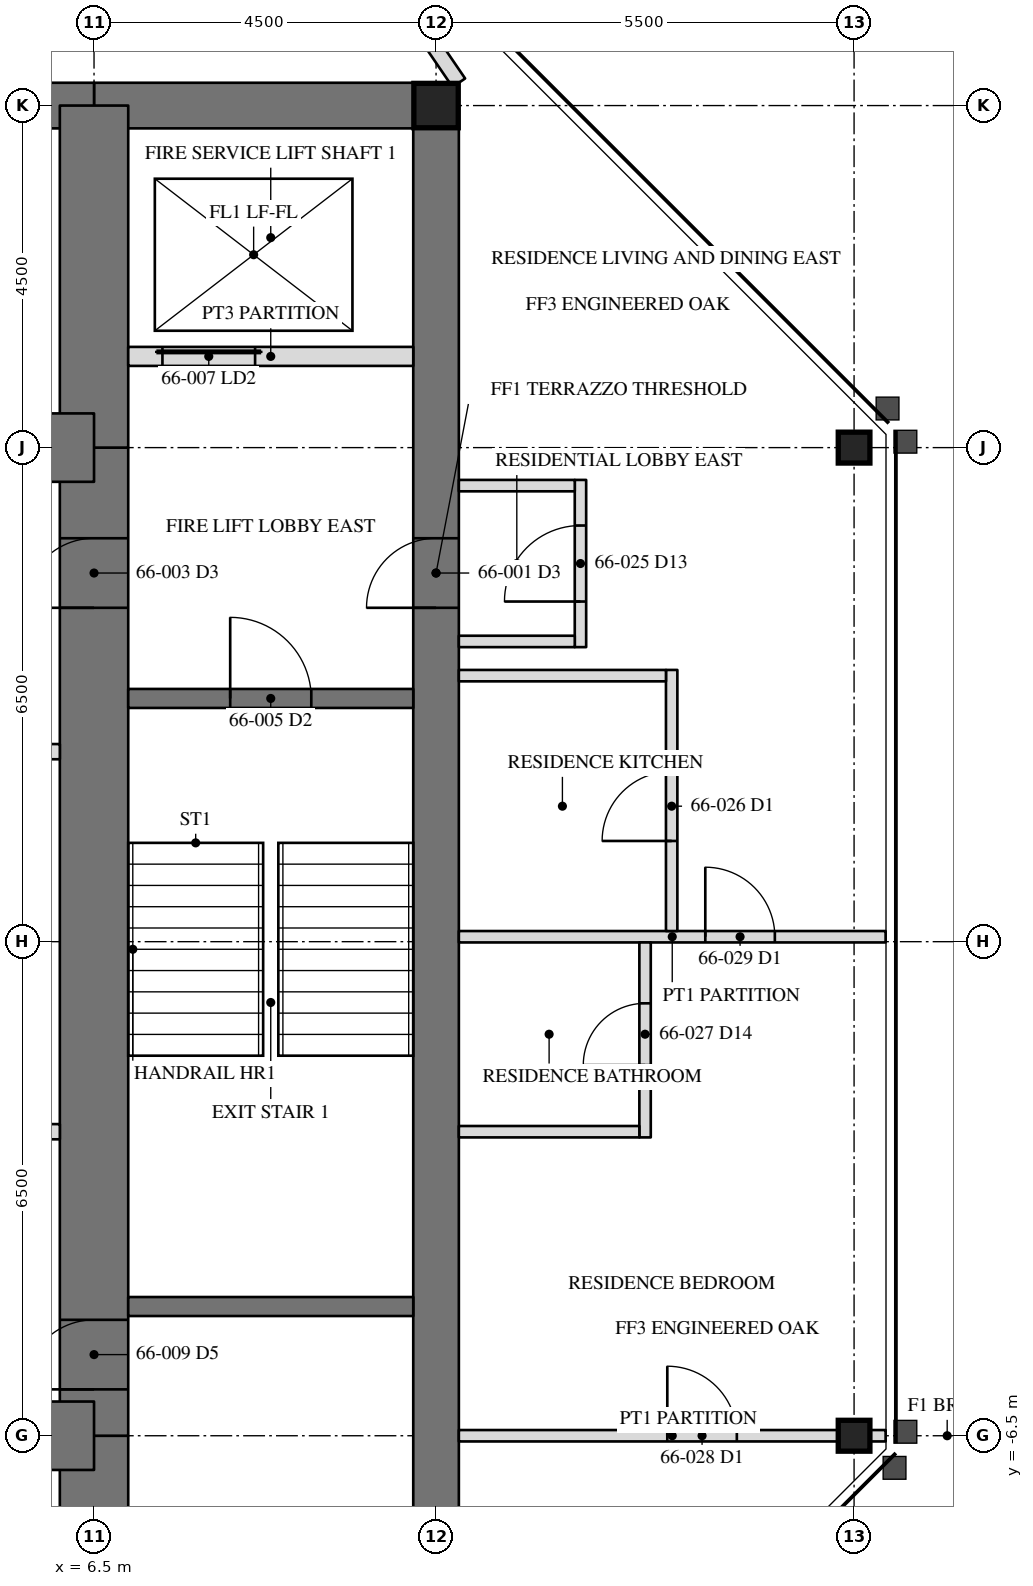
"""IFC4 building model, lengths in metres.
Left out: names, types, materials, properties, quantities, classifications, styles, units other than length and angle.
Written with IfcOpenShell. Run it as: python <this file> out.ifc"""

import sys

from ifc_helpers import new_model, si_unit, direction, frame, frame_2d, origin, origin_2d, place, context, subcontext, project, spatial, rectangle, hollow_rectangle, i_section, extrude, element, fill, save


model = new_model("IFC4")
c1 = context("Model", 3, precision=1e-05, world=origin(), true_north=direction((0.0, 1.0)))
c2 = subcontext(c1, "Body", "Model", "MODEL_VIEW")
j1 = project(units=[si_unit("LENGTHUNIT", "METRE"), si_unit("PLANEANGLEUNIT", "RADIAN")], contexts=[c1])
p1 = place(None, origin())
s1 = spatial("IfcSite", under=j1, at=p1, CompositionType="ELEMENT")
p2 = place(p1, origin())
s2 = spatial("IfcBuilding", under=s1, at=p2, CompositionType="ELEMENT")
p3 = place(p2, frame((0.0, 0.0, 270.4)))
s3 = spatial("IfcBuildingStorey", under=s2, at=p3, CompositionType="ELEMENT", Elevation=270.4)
for number, where, z_axis, x_axis in (
    (1, (16.5, -6.5, 0.0), (0.0, 0.0, 1.0), (0.0, 1.0, 0.0)),
    (2, (16.5, 6.5, 0.0), (0.0, 0.0, 1.0), (0.0, 1.0, 0.0)),
):
    element("IfcColumn", number, at=place(p3, frame(where, z_axis=z_axis, x_axis=x_axis)), inside=s3, PredefinedType="COLUMN", context=c2, shape_type="SweptSolid", body=[
        extrude(i_section(OverallWidth=0.406, OverallDepth=0.417, WebThickness=0.03, FlangeThickness=0.048, at=origin_2d()), origin(), (0.0, 0.0, 1.0), 3.6),
    ])
p4 = place(p3, frame((11.0, -11.0, 0.0), z_axis=(0.0, 0.0, 1.0), x_axis=(0.0, 1.0, 0.0)))
e3 = element("IfcWall", 3, at=p4, inside=s3, PredefinedType="SHEAR", context=c2, shape_type="SweptSolid", body=[
    extrude(rectangle(XDim=22.0, YDim=0.6, at=frame_2d((11.0, 0.0))), origin(), (0.0, 0.0, 1.0), 3.6),
])
p5 = place(p4, frame((15.393, 0.0, 0.0)))
e4 = element("IfcOpeningElement", 4, at=p5, cuts=e3, PredefinedType="OPENING", context=c2, shape_type="SweptSolid", body=[
    extrude(rectangle(XDim=0.915, YDim=2.134, at=frame_2d((0.458, 1.067))), frame((0.0, 0.31, 0.0), z_axis=(0.0, -1.0, 0.0), x_axis=(1.0, 0.0, 0.0)), (0.0, 0.0, 1.0), 0.62),
])
p6 = place(p3, frame((11.0, 11.0, 0.0), z_axis=(0.0, 0.0, 1.0), x_axis=(-1.0, 0.0, 0.0)))
e5 = element("IfcWall", 5, at=p6, inside=s3, PredefinedType="SHEAR", context=c2, shape_type="SweptSolid", body=[
    extrude(rectangle(XDim=4.5, YDim=0.6, at=frame_2d((2.25, 0.0))), origin(), (0.0, 0.0, 1.0), 3.6),
])
p7 = place(p3, frame((6.5, 11.0, 0.0), z_axis=(0.0, 0.0, 1.0), x_axis=(-1.0, 0.0, 0.0)))
e6 = element("IfcWall", 6, at=p7, inside=s3, PredefinedType="SHEAR", context=c2, shape_type="SweptSolid", body=[
    extrude(rectangle(XDim=13.0, YDim=0.6, at=frame_2d((6.5, 0.0))), origin(), (0.0, 0.0, 1.0), 3.6),
])
p8 = place(p7, frame((6.0, 0.0, 0.0)))
e7 = element("IfcOpeningElement", 7, at=p8, cuts=e6, PredefinedType="OPENING", context=c2, shape_type="SweptSolid", body=[
    extrude(rectangle(XDim=1.0, YDim=2.134, at=frame_2d((0.5, 1.067))), frame((0.0, 0.31, 0.0), z_axis=(0.0, -1.0, 0.0), x_axis=(1.0, 0.0, 0.0)), (0.0, 0.0, 1.0), 0.62),
])
p9 = place(p3, frame((6.5, -11.0, 0.0), z_axis=(0.0, 0.0, 1.0), x_axis=(0.0, 1.0, 0.0)))
e8 = element("IfcWall", 8, at=p9, inside=s3, PredefinedType="SHEAR", context=c2, shape_type="SweptSolid", body=[
    extrude(rectangle(XDim=4.5, YDim=0.9, at=frame_2d((2.25, 0.0))), origin(), (0.0, 0.0, 1.0), 3.6),
])
p10 = place(p3, frame((6.5, -6.5, 0.0), z_axis=(0.0, 0.0, 1.0), x_axis=(0.0, 1.0, 0.0)))
e9 = element("IfcWall", 9, at=p10, inside=s3, PredefinedType="SHEAR", context=c2, shape_type="SweptSolid", body=[
    extrude(rectangle(XDim=13.0, YDim=0.9, at=frame_2d((6.5, 0.0))), origin(), (0.0, 0.0, 1.0), 3.6),
])
p11 = place(p10, frame((10.893, 0.0, 0.0)))
e10 = element("IfcOpeningElement", 10, at=p11, cuts=e9, PredefinedType="OPENING", context=c2, shape_type="SweptSolid", body=[
    extrude(rectangle(XDim=0.915, YDim=2.134, at=frame_2d((0.458, 1.067))), frame((0.0, 0.46, 0.0), z_axis=(0.0, -1.0, 0.0), x_axis=(1.0, 0.0, 0.0)), (0.0, 0.0, 1.0), 0.92),
])
p12 = place(p10, frame((0.61, 0.0, 0.0)))
e11 = element("IfcOpeningElement", 11, at=p12, cuts=e9, PredefinedType="OPENING", context=c2, shape_type="SweptSolid", body=[
    extrude(rectangle(XDim=0.915, YDim=2.134, at=frame_2d((0.458, 1.067))), frame((0.0, 0.46, 0.0), z_axis=(0.0, -1.0, 0.0), x_axis=(1.0, 0.0, 0.0)), (0.0, 0.0, 1.0), 0.92),
])
p13 = place(p3, frame((6.5, 6.5, 0.0), z_axis=(0.0, 0.0, 1.0), x_axis=(0.0, 1.0, 0.0)))
e12 = element("IfcWall", 12, at=p13, inside=s3, PredefinedType="SHEAR", context=c2, shape_type="SweptSolid", body=[
    extrude(rectangle(XDim=4.5, YDim=0.9, at=frame_2d((2.25, 0.0))), origin(), (0.0, 0.0, 1.0), 3.6),
])
p14 = place(p3, frame((6.5, 6.5, 0.0), z_axis=(0.0, 0.0, 1.0), x_axis=(-1.0, 0.0, 0.0)))
e13 = element("IfcWall", 13, at=p14, inside=s3, PredefinedType="SHEAR", context=c2, shape_type="SweptSolid", body=[
    extrude(rectangle(XDim=13.0, YDim=0.9, at=frame_2d((6.5, 0.0))), origin(), (0.0, 0.0, 1.0), 3.6),
])
p15 = place(p14, frame((6.042, 0.0, 0.0)))
e14 = element("IfcOpeningElement", 14, at=p15, cuts=e13, PredefinedType="OPENING", context=c2, shape_type="SweptSolid", body=[
    extrude(rectangle(XDim=0.915, YDim=2.134, at=frame_2d((0.458, 1.067))), frame((0.0, 0.46, 0.0), z_axis=(0.0, -1.0, 0.0), x_axis=(1.0, 0.0, 0.0)), (0.0, 0.0, 1.0), 0.92),
])
p16 = place(p14, frame((9.466, 0.0, 0.0)))
e15 = element("IfcOpeningElement", 15, at=p16, cuts=e13, PredefinedType="OPENING", context=c2, shape_type="SweptSolid", body=[
    extrude(rectangle(XDim=1.118, YDim=2.134, at=frame_2d((0.559, 1.067))), frame((0.0, 0.46, 0.0), z_axis=(0.0, -1.0, 0.0), x_axis=(1.0, 0.0, 0.0)), (0.0, 0.0, 1.0), 0.92),
])
p17 = place(p14, frame((1.917, 0.0, 0.0)))
e16 = element("IfcOpeningElement", 16, at=p17, cuts=e13, PredefinedType="OPENING", context=c2, shape_type="SweptSolid", body=[
    extrude(rectangle(XDim=0.915, YDim=2.134, at=frame_2d((0.458, 1.067))), frame((0.0, 0.46, 0.0), z_axis=(0.0, -1.0, 0.0), x_axis=(1.0, 0.0, 0.0)), (0.0, 0.0, 1.0), 0.92),
])
p18 = place(p3, frame((-6.5, -6.5, 0.0), z_axis=(0.0, 0.0, 1.0), x_axis=(1.0, 0.0, 0.0)))
e17 = element("IfcWall", 17, at=p18, inside=s3, PredefinedType="SHEAR", context=c2, shape_type="SweptSolid", body=[
    extrude(rectangle(XDim=13.0, YDim=0.9, at=frame_2d((6.5, 0.0))), origin(), (0.0, 0.0, 1.0), 3.6),
])
p19 = place(p18, frame((6.042, 0.0, 0.0)))
e18 = element("IfcOpeningElement", 18, at=p19, cuts=e17, PredefinedType="OPENING", context=c2, shape_type="SweptSolid", body=[
    extrude(rectangle(XDim=0.915, YDim=2.134, at=frame_2d((0.458, 1.067))), frame((0.0, 0.46, 0.0), z_axis=(0.0, -1.0, 0.0), x_axis=(1.0, 0.0, 0.0)), (0.0, 0.0, 1.0), 0.92),
])
p20 = place(p18, frame((2.218, 0.0, 0.0)))
e19 = element("IfcOpeningElement", 19, at=p20, cuts=e17, PredefinedType="OPENING", context=c2, shape_type="SweptSolid", body=[
    extrude(rectangle(XDim=0.915, YDim=2.134, at=frame_2d((0.458, 1.067))), frame((0.0, 0.46, 0.0), z_axis=(0.0, -1.0, 0.0), x_axis=(1.0, 0.0, 0.0)), (0.0, 0.0, 1.0), 0.92),
])
p21 = place(p18, frame((9.867, 0.0, 0.0)))
e20 = element("IfcOpeningElement", 20, at=p21, cuts=e17, PredefinedType="OPENING", context=c2, shape_type="SweptSolid", body=[
    extrude(rectangle(XDim=0.915, YDim=2.134, at=frame_2d((0.458, 1.067))), frame((0.0, 0.46, 0.0), z_axis=(0.0, -1.0, 0.0), x_axis=(1.0, 0.0, 0.0)), (0.0, 0.0, 1.0), 0.92),
])
p22 = place(p3, frame((11.0, 11.0, 0.0), z_axis=(0.0, 0.0, 1.0), x_axis=(1.0, 0.0, 0.0)))
e21 = element("IfcColumn", 21, at=p22, inside=s3, PredefinedType="COLUMN", context=c2, shape_type="SweptSolid", body=[
    extrude(hollow_rectangle(XDim=0.584, YDim=0.584, WallThickness=0.051, at=origin_2d()), origin(), (0.0, 0.0, 1.0), 3.6),
])
p23 = place(p3, frame((6.95, -4.8, 0.0), z_axis=(0.0, 0.0, 1.0), x_axis=(1.0, 0.0, 0.0)))
e22 = element("IfcWall", 22, at=p23, inside=s3, PredefinedType="SOLIDWALL", context=c2, shape_type="SweptSolid", body=[
    extrude(rectangle(XDim=3.75, YDim=0.25, at=frame_2d((1.875, 0.0))), origin(), (0.0, 0.0, 1.0), 3.41),
])
p24 = place(p3, frame((6.95, 3.2, 0.0), z_axis=(0.0, 0.0, 1.0), x_axis=(1.0, 0.0, 0.0)))
e23 = element("IfcWall", 23, at=p24, inside=s3, PredefinedType="SOLIDWALL", context=c2, shape_type="SweptSolid", body=[
    extrude(rectangle(XDim=3.75, YDim=0.25, at=frame_2d((1.875, 0.0))), origin(), (0.0, 0.0, 1.0), 3.41),
])
p25 = place(p24, frame((1.342, 0.0, 0.0)))
e24 = element("IfcOpeningElement", 24, at=p25, cuts=e23, PredefinedType="OPENING", context=c2, shape_type="SweptSolid", body=[
    extrude(rectangle(XDim=1.067, YDim=2.134, at=frame_2d((0.533, 1.067))), frame((0.0, 0.135, 0.0), z_axis=(0.0, -1.0, 0.0), x_axis=(1.0, 0.0, 0.0)), (0.0, 0.0, 1.0), 0.27),
])
p26 = place(p3, frame((6.95, 7.7, 0.0), z_axis=(0.0, 0.0, 1.0), x_axis=(1.0, 0.0, 0.0)))
e25 = element("IfcWall", 25, at=p26, inside=s3, PredefinedType="PARTITIONING", context=c2, shape_type="SweptSolid", body=[
    extrude(rectangle(XDim=3.75, YDim=0.25, at=frame_2d((1.875, 0.0))), origin(), (0.0, 0.0, 1.0), 3.41),
])
p27 = place(p26, frame((0.45, 0.0, 0.0)))
e26 = element("IfcOpeningElement", 26, at=p27, cuts=e25, PredefinedType="OPENING", context=c2, shape_type="SweptSolid", body=[
    extrude(rectangle(XDim=1.219, YDim=2.134, at=frame_2d((0.609, 1.067))), frame((0.0, 0.135, 0.0), z_axis=(0.0, -1.0, 0.0), x_axis=(1.0, 0.0, 0.0)), (0.0, 0.0, 1.0), 0.27),
])
p28 = place(p3, frame((-6.05, 2.5, 0.0), z_axis=(0.0, 0.0, 1.0), x_axis=(1.0, 0.0, 0.0)))
e27 = element("IfcWall", 27, at=p28, inside=s3, PredefinedType="PARTITIONING", context=c2, shape_type="SweptSolid", body=[
    extrude(rectangle(XDim=12.1, YDim=0.2, at=frame_2d((6.05, 0.0))), origin(), (0.0, 0.0, 1.0), 3.41),
])
p29 = place(p28, frame((1.408, 0.0, 0.0)))
e28 = element("IfcOpeningElement", 28, at=p29, cuts=e27, PredefinedType="OPENING", context=c2, shape_type="SweptSolid", body=[
    extrude(rectangle(XDim=1.067, YDim=2.134, at=frame_2d((0.533, 1.067))), frame((0.0, 0.11, 0.0), z_axis=(0.0, -1.0, 0.0), x_axis=(1.0, 0.0, 0.0)), (0.0, 0.0, 1.0), 0.22),
])
p30 = place(p28, frame((5.517, 0.0, 0.0)))
e29 = element("IfcOpeningElement", 29, at=p30, cuts=e27, PredefinedType="OPENING", context=c2, shape_type="SweptSolid", body=[
    extrude(rectangle(XDim=1.067, YDim=2.134, at=frame_2d((0.533, 1.067))), frame((0.0, 0.11, 0.0), z_axis=(0.0, -1.0, 0.0), x_axis=(1.0, 0.0, 0.0)), (0.0, 0.0, 1.0), 0.22),
])
p31 = place(p28, frame((9.625, 0.0, 0.0)))
e30 = element("IfcOpeningElement", 30, at=p31, cuts=e27, PredefinedType="OPENING", context=c2, shape_type="SweptSolid", body=[
    extrude(rectangle(XDim=1.067, YDim=2.134, at=frame_2d((0.533, 1.067))), frame((0.0, 0.11, 0.0), z_axis=(0.0, -1.0, 0.0), x_axis=(1.0, 0.0, 0.0)), (0.0, 0.0, 1.0), 0.22),
])
p32 = place(p3, frame((6.05, -2.5, 0.0), z_axis=(0.0, 0.0, 1.0), x_axis=(-1.0, 0.0, 0.0)))
e31 = element("IfcWall", 31, at=p32, inside=s3, PredefinedType="PARTITIONING", context=c2, shape_type="SweptSolid", body=[
    extrude(rectangle(XDim=12.1, YDim=0.2, at=frame_2d((6.05, 0.0))), origin(), (0.0, 0.0, 1.0), 3.41),
])
p33 = place(p32, frame((9.625, 0.0, 0.0)))
e32 = element("IfcOpeningElement", 32, at=p33, cuts=e31, PredefinedType="OPENING", context=c2, shape_type="SweptSolid", body=[
    extrude(rectangle(XDim=1.067, YDim=2.134, at=frame_2d((0.533, 1.067))), frame((0.0, 0.11, 0.0), z_axis=(0.0, -1.0, 0.0), x_axis=(1.0, 0.0, 0.0)), (0.0, 0.0, 1.0), 0.22),
])
p34 = place(p32, frame((5.517, 0.0, 0.0)))
e33 = element("IfcOpeningElement", 33, at=p34, cuts=e31, PredefinedType="OPENING", context=c2, shape_type="SweptSolid", body=[
    extrude(rectangle(XDim=1.067, YDim=2.134, at=frame_2d((0.533, 1.067))), frame((0.0, 0.11, 0.0), z_axis=(0.0, -1.0, 0.0), x_axis=(1.0, 0.0, 0.0)), (0.0, 0.0, 1.0), 0.22),
])
p35 = place(p32, frame((1.408, 0.0, 0.0)))
e34 = element("IfcOpeningElement", 34, at=p35, cuts=e31, PredefinedType="OPENING", context=c2, shape_type="SweptSolid", body=[
    extrude(rectangle(XDim=1.067, YDim=2.134, at=frame_2d((0.533, 1.067))), frame((0.0, 0.11, 0.0), z_axis=(0.0, -1.0, 0.0), x_axis=(1.0, 0.0, 0.0)), (0.0, 0.0, 1.0), 0.22),
])
p36 = place(p3, frame((11.3, 11.3, 0.0), z_axis=(0.0, 0.0, 1.0), x_axis=(-0.563469639691, 0.826136771453, 0.0)))
e35 = element("IfcWall", 35, at=p36, inside=s3, PredefinedType="PARTITIONING", context=c2, shape_type="SweptSolid", body=[
    extrude(rectangle(XDim=3.137, YDim=0.2, at=frame_2d((1.568, 0.0))), origin(), (0.0, 0.0, 1.0), 2.704),
])
p37 = place(p3, frame((11.3, -6.5, 0.0), z_axis=(0.0, 0.0, 1.0), x_axis=(1.0, 0.0, 0.0)))
e36 = element("IfcWall", 36, at=p37, inside=s3, PredefinedType="PARTITIONING", context=c2, shape_type="SweptSolid", body=[
    extrude(rectangle(XDim=5.615, YDim=0.15, at=frame_2d((2.808, 0.0))), origin(), (0.0, 0.0, 1.0), 2.966),
])
p38 = place(p37, frame((2.742, 0.0, 0.0)))
e37 = element("IfcOpeningElement", 37, at=p38, cuts=e36, PredefinedType="OPENING", context=c2, shape_type="SweptSolid", body=[
    extrude(rectangle(XDim=0.915, YDim=2.134, at=frame_2d((0.458, 1.067))), frame((0.0, 0.085, 0.0), z_axis=(0.0, -1.0, 0.0), x_axis=(1.0, 0.0, 0.0)), (0.0, 0.0, 1.0), 0.17),
])
p39 = place(p3, frame((11.3, 0.065, 0.0), z_axis=(0.0, 0.0, 1.0), x_axis=(1.0, 0.0, 0.0)))
e38 = element("IfcWall", 38, at=p39, inside=s3, PredefinedType="PARTITIONING", context=c2, shape_type="SweptSolid", body=[
    extrude(rectangle(XDim=5.615, YDim=0.15, at=frame_2d((2.808, 0.0))), origin(), (0.0, 0.0, 1.0), 2.709),
])
p40 = place(p39, frame((3.242, 0.0, 0.0)))
e39 = element("IfcOpeningElement", 39, at=p40, cuts=e38, PredefinedType="OPENING", context=c2, shape_type="SweptSolid", body=[
    extrude(rectangle(XDim=0.915, YDim=2.134, at=frame_2d((0.458, 1.067))), frame((0.0, 0.085, 0.0), z_axis=(0.0, -1.0, 0.0), x_axis=(1.0, 0.0, 0.0)), (0.0, 0.0, 1.0), 0.17),
])
p41 = place(p3, frame((12.9, 3.875, 0.0), z_axis=(0.0, 0.0, 1.0), x_axis=(0.0, 1.0, 0.0)))
e40 = element("IfcWall", 40, at=p41, inside=s3, PredefinedType="PARTITIONING", context=c2, shape_type="SweptSolid", body=[
    extrude(rectangle(XDim=2.2, YDim=0.15, at=frame_2d((1.1, 0.0))), origin(), (0.0, 0.0, 1.0), 3.41),
])
p42 = place(p41, frame((0.6, 0.0, 0.0)))
e41 = element("IfcOpeningElement", 41, at=p42, cuts=e40, PredefinedType="OPENING", context=c2, shape_type="SweptSolid", body=[
    extrude(rectangle(XDim=1.0, YDim=2.134, at=frame_2d((0.5, 1.067))), frame((0.0, 0.085, 0.0), z_axis=(0.0, -1.0, 0.0), x_axis=(1.0, 0.0, 0.0)), (0.0, 0.0, 1.0), 0.17),
])
for number, where, z_axis, x_axis in (
    (42, (11.3, 3.95, 0.0), (0.0, 0.0, 1.0), (1.0, 0.0, 0.0)),
    (43, (11.3, 6.0, 0.0), (0.0, 0.0, 1.0), (1.0, 0.0, 0.0)),
):
    element("IfcWall", number, at=place(p3, frame(where, z_axis=z_axis, x_axis=x_axis)), inside=s3, PredefinedType="PARTITIONING", context=c2, shape_type="SweptSolid", body=[
        extrude(rectangle(XDim=1.525, YDim=0.15, at=frame_2d((0.762, 0.0))), origin(), (0.0, 0.0, 1.0), 3.41),
    ])
p43 = place(p3, frame((14.1, 0.14, 0.0), z_axis=(0.0, 0.0, 1.0), x_axis=(0.0, 1.0, 0.0)))
e44 = element("IfcWall", 44, at=p43, inside=s3, PredefinedType="PARTITIONING", context=c2, shape_type="SweptSolid", body=[
    extrude(rectangle(XDim=3.435, YDim=0.15, at=frame_2d((1.718, 0.0))), origin(), (0.0, 0.0, 1.0), 3.41),
])
p44 = place(p43, frame((1.185, 0.0, 0.0)))
e45 = element("IfcOpeningElement", 45, at=p44, cuts=e44, PredefinedType="OPENING", context=c2, shape_type="SweptSolid", body=[
    extrude(rectangle(XDim=0.915, YDim=2.134, at=frame_2d((0.458, 1.067))), frame((0.0, 0.085, 0.0), z_axis=(0.0, -1.0, 0.0), x_axis=(1.0, 0.0, 0.0)), (0.0, 0.0, 1.0), 0.17),
])
p45 = place(p3, frame((11.3, 3.5, 0.0), z_axis=(0.0, 0.0, 1.0), x_axis=(1.0, 0.0, 0.0)))
e46 = element("IfcWall", 46, at=p45, inside=s3, PredefinedType="PARTITIONING", context=c2, shape_type="SweptSolid", body=[
    extrude(rectangle(XDim=2.725, YDim=0.15, at=frame_2d((1.362, 0.0))), origin(), (0.0, 0.0, 1.0), 3.41),
])
p46 = place(p3, frame((13.75, -2.575, 0.0), z_axis=(0.0, 0.0, 1.0), x_axis=(0.0, 1.0, 0.0)))
e47 = element("IfcWall", 47, at=p46, inside=s3, PredefinedType="PARTITIONING", context=c2, shape_type="SweptSolid", body=[
    extrude(rectangle(XDim=2.565, YDim=0.15, at=frame_2d((1.282, 0.0))), origin(), (0.0, 0.0, 1.0), 3.41),
])
p47 = place(p46, frame((0.951, 0.0, 0.0)))
e48 = element("IfcOpeningElement", 48, at=p47, cuts=e47, PredefinedType="OPENING", context=c2, shape_type="SweptSolid", body=[
    extrude(rectangle(XDim=0.813, YDim=2.032, at=frame_2d((0.406, 1.016))), frame((0.0, 0.085, 0.0), z_axis=(0.0, -1.0, 0.0), x_axis=(1.0, 0.0, 0.0)), (0.0, 0.0, 1.0), 0.17),
])
p48 = place(p3, frame((11.3, -2.5, 0.0), z_axis=(0.0, 0.0, 1.0), x_axis=(1.0, 0.0, 0.0)))
e49 = element("IfcWall", 49, at=p48, inside=s3, PredefinedType="PARTITIONING", context=c2, shape_type="SweptSolid", body=[
    extrude(rectangle(XDim=2.375, YDim=0.15, at=frame_2d((1.188, 0.0))), origin(), (0.0, 0.0, 1.0), 3.41),
])
p49 = place(p5, origin())
e50 = element("IfcDoor", 50, at=p49, inside=s3, OperationType="SINGLE_SWING_RIGHT", PredefinedType="DOOR", context=c2, shape_type="SweptSolid", body=[
    extrude(rectangle(XDim=0.915, YDim=2.134, at=frame_2d((0.458, 1.067))), frame((0.0, -0.225, 0.0), z_axis=(0.0, -1.0, 0.0), x_axis=(1.0, 0.0, 0.0)), (0.0, 0.0, 1.0), 0.05),
])
fill(e4, e50)
p50 = place(p11, origin())
e51 = element("IfcDoor", 51, at=p50, inside=s3, OperationType="SINGLE_SWING_RIGHT", PredefinedType="DOOR", context=c2, shape_type="SweptSolid", body=[
    extrude(rectangle(XDim=0.915, YDim=2.134, at=frame_2d((0.458, 1.067))), frame((0.0, -0.375, 0.0), z_axis=(0.0, -1.0, 0.0), x_axis=(1.0, 0.0, 0.0)), (0.0, 0.0, 1.0), 0.05),
])
fill(e10, e51)
p51 = place(p25, origin())
e52 = element("IfcDoor", 52, at=p51, inside=s3, OperationType="SINGLE_SWING_LEFT", PredefinedType="DOOR", context=c2, shape_type="SweptSolid", body=[
    extrude(rectangle(XDim=1.067, YDim=2.134, at=frame_2d((0.533, 1.067))), frame((0.0, 0.025, 0.0), z_axis=(0.0, -1.0, 0.0), x_axis=(1.0, 0.0, 0.0)), (0.0, 0.0, 1.0), 0.05),
])
fill(e24, e52)
p52 = place(p27, origin())
e53 = element("IfcDoor", 53, at=p52, inside=s3, OperationType="SLIDING_TO_LEFT", PredefinedType="DOOR", context=c2, shape_type="SweptSolid", body=[
    extrude(rectangle(XDim=1.219, YDim=2.134, at=frame_2d((0.609, 1.067))), frame((0.0, 0.025, 0.0), z_axis=(0.0, -1.0, 0.0), x_axis=(1.0, 0.0, 0.0)), (0.0, 0.0, 1.0), 0.05),
])
fill(e26, e53)
p53 = place(p12, origin())
e54 = element("IfcDoor", 54, at=p53, inside=s3, OperationType="SINGLE_SWING_RIGHT", PredefinedType="DOOR", context=c2, shape_type="SweptSolid", body=[
    extrude(rectangle(XDim=0.915, YDim=2.134, at=frame_2d((0.458, 1.067))), frame((0.0, -0.375, 0.0), z_axis=(0.0, -1.0, 0.0), x_axis=(1.0, 0.0, 0.0)), (0.0, 0.0, 1.0), 0.05),
])
fill(e11, e54)
p54 = place(p42, origin())
e55 = element("IfcDoor", 55, at=p54, inside=s3, OperationType="SINGLE_SWING_RIGHT", PredefinedType="DOOR", context=c2, shape_type="SweptSolid", body=[
    extrude(rectangle(XDim=1.0, YDim=2.134, at=frame_2d((0.5, 1.067))), frame((0.0, 0.025, 0.0), z_axis=(0.0, -1.0, 0.0), x_axis=(1.0, 0.0, 0.0)), (0.0, 0.0, 1.0), 0.05),
])
fill(e41, e55)
p55 = place(p44, origin())
e56 = element("IfcDoor", 56, at=p55, inside=s3, OperationType="SINGLE_SWING_LEFT", PredefinedType="DOOR", context=c2, shape_type="SweptSolid", body=[
    extrude(rectangle(XDim=0.915, YDim=2.134, at=frame_2d((0.458, 1.067))), frame((0.0, 0.025, 0.0), z_axis=(0.0, -1.0, 0.0), x_axis=(1.0, 0.0, 0.0)), (0.0, 0.0, 1.0), 0.05),
])
fill(e45, e56)
p56 = place(p47, origin())
e57 = element("IfcDoor", 57, at=p56, inside=s3, OperationType="SINGLE_SWING_LEFT", PredefinedType="DOOR", context=c2, shape_type="SweptSolid", body=[
    extrude(rectangle(XDim=0.813, YDim=2.032, at=frame_2d((0.406, 1.016))), frame((0.0, 0.025, 0.0), z_axis=(0.0, -1.0, 0.0), x_axis=(1.0, 0.0, 0.0)), (0.0, 0.0, 1.0), 0.05),
])
fill(e48, e57)
p57 = place(p38, origin())
e58 = element("IfcDoor", 58, at=p57, inside=s3, OperationType="SINGLE_SWING_LEFT", PredefinedType="DOOR", context=c2, shape_type="SweptSolid", body=[
    extrude(rectangle(XDim=0.915, YDim=2.134, at=frame_2d((0.458, 1.067))), frame((0.0, 0.025, 0.0), z_axis=(0.0, -1.0, 0.0), x_axis=(1.0, 0.0, 0.0)), (0.0, 0.0, 1.0), 0.05),
])
fill(e37, e58)
p58 = place(p40, origin())
e59 = element("IfcDoor", 59, at=p58, inside=s3, OperationType="SINGLE_SWING_LEFT", PredefinedType="DOOR", context=c2, shape_type="SweptSolid", body=[
    extrude(rectangle(XDim=0.915, YDim=2.134, at=frame_2d((0.458, 1.067))), frame((0.0, 0.025, 0.0), z_axis=(0.0, -1.0, 0.0), x_axis=(1.0, 0.0, 0.0)), (0.0, 0.0, 1.0), 0.05),
])
fill(e39, e59)
save(model, sys.argv[1])
